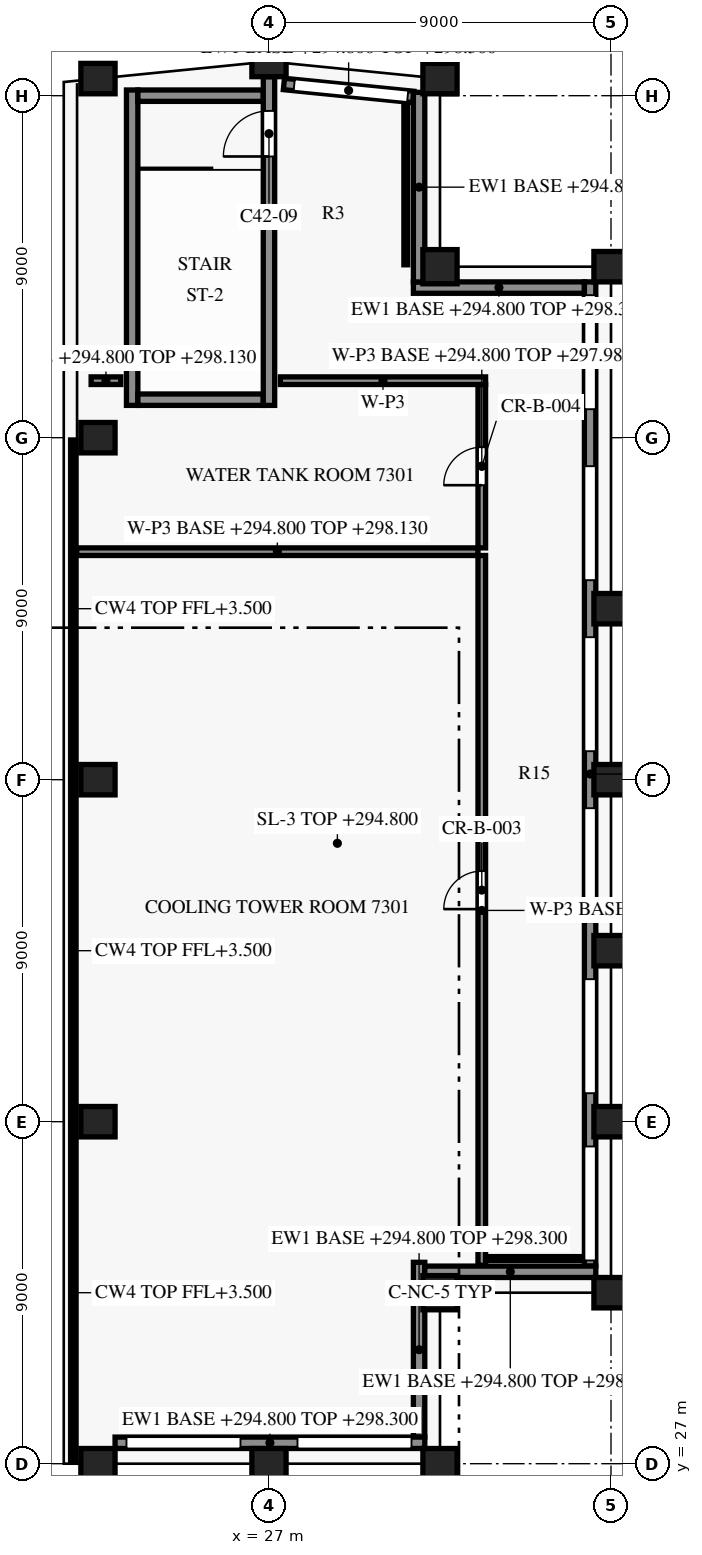
"""IFC4 building model, lengths in metres.
Left out: names, types, materials, properties, quantities, classifications, styles, units other than length and angle.
Written with IfcOpenShell. Run it as: python <this file> out.ifc"""

import sys

from ifc_helpers import new_model, si_unit, direction, frame, frame_2d, origin, origin_2d, place, context, subcontext, project, spatial, rectangle, extrude, element, fill, save


model = new_model("IFC4")
c1 = context("Model", 3, precision=1e-05, world=origin(), true_north=direction((0.0, 1.0)))
c2 = subcontext(c1, "Body", "Model", "MODEL_VIEW")
j1 = project(units=[si_unit("LENGTHUNIT", "METRE"), si_unit("PLANEANGLEUNIT", "RADIAN")], contexts=[c1])
p1 = place(None, origin())
s1 = spatial("IfcSite", under=j1, at=p1, CompositionType="ELEMENT")
p2 = place(p1, origin())
s2 = spatial("IfcBuilding", under=s1, at=p2, CompositionType="ELEMENT")
p3 = place(p2, frame((0.0, 0.0, 294.8)))
s3 = spatial("IfcBuildingStorey", under=s2, at=p3, CompositionType="ELEMENT", Elevation=294.8)
for number, where, z_axis, x_axis in (
    (1, (36.0, 31.5, 0.0), (0.0, 0.0, 1.0), (0.0, 1.0, 0.0)),
    (2, (36.0, 36.0, 0.0), (0.0, 0.0, 1.0), (0.0, 1.0, 0.0)),
    (3, (36.0, 40.5, 0.0), (0.0, 0.0, 1.0), (0.0, 1.0, 0.0)),
    (4, (36.0, 45.0, 0.0), (0.0, 0.0, 1.0), (0.0, 1.0, 0.0)),
    (5, (36.0, 49.5, 0.0), (0.0, 0.0, 1.0), (0.0, 1.0, 0.0)),
    (6, (36.0, 58.5, 0.0), (0.0, 0.0, 1.0), (0.0, 1.0, 0.0)),
    (7, (31.5, 63.45, 0.0), (0.0, 0.0, 1.0), (-0.995, 0.1, 0.0)),
    (8, (27.0, 63.9, 0.0), (0.0, 0.0, 1.0), (-1.0, 0.0, 0.0)),
    (9, (22.5, 63.45, 0.0), (0.0, 0.0, 1.0), (-0.995, -0.1, 0.0)),
    (10, (22.5, 54.0, 0.0), (0.0, 0.0, 1.0), (1.0, 0.0, 0.0)),
    (11, (22.5, 45.0, 0.0), (0.0, 0.0, 1.0), (1.0, 0.0, 0.0)),
    (12, (22.5, 36.0, 0.0), (0.0, 0.0, 1.0), (1.0, 0.0, 0.0)),
):
    element("IfcColumn", number, at=place(p3, frame(where, z_axis=z_axis, x_axis=x_axis)), inside=s3, PredefinedType="COLUMN", context=c2, shape_type="SweptSolid", body=[
        extrude(rectangle(XDim=0.9, YDim=0.8, at=origin_2d()), origin(), (0.0, 0.0, 1.0), 4.0),
    ])
for number, where, z_axis, x_axis in (
    (13, (31.5, 31.5, 0.0), (0.0, 0.0, 1.0), (1.0, 0.0, 0.0)),
    (14, (31.5, 58.5, 0.0), (0.0, 0.0, 1.0), (1.0, 0.0, 0.0)),
):
    element("IfcColumn", number, at=place(p3, frame(where, z_axis=z_axis, x_axis=x_axis)), inside=s3, PredefinedType="COLUMN", context=c2, shape_type="SweptSolid", body=[
        extrude(rectangle(XDim=0.9, YDim=0.9, at=origin_2d()), origin(), (0.0, 0.0, 1.0), 4.0),
    ])
for number, where, z_axis, x_axis in (
    (15, (22.5, 27.0, 0.0), (0.0, 0.0, 1.0), (1.0, 0.0, 0.0)),
    (16, (27.0, 27.0, 0.0), (0.0, 0.0, 1.0), (1.0, 0.0, 0.0)),
    (17, (31.5, 27.0, 0.0), (0.0, 0.0, 1.0), (1.0, 0.0, 0.0)),
):
    element("IfcColumn", number, at=place(p3, frame(where, z_axis=z_axis, x_axis=x_axis)), inside=s3, PredefinedType="COLUMN", context=c2, shape_type="SweptSolid", body=[
        extrude(rectangle(XDim=0.9, YDim=0.8, at=origin_2d()), origin(), (0.0, 0.0, 1.0), 4.0),
    ])
p4 = place(p3, frame((31.1, 27.55, 0.0), z_axis=(0.0, 0.0, 1.0), x_axis=(-1.0, 0.0, 0.0)))
e18 = element("IfcWall", 18, at=p4, inside=s3, PredefinedType="SOLIDWALL", context=c2, shape_type="SweptSolid", body=[
    extrude(rectangle(XDim=8.15, YDim=0.3, at=frame_2d((4.075, 0.0))), origin(), (0.0, 0.0, 1.0), 3.5),
])
p5 = place(p4, frame((0.35, 0.0, 0.9)))
e19 = element("IfcOpeningElement", 19, at=p5, cuts=e18, PredefinedType="OPENING", context=c2, shape_type="SweptSolid", body=[
    extrude(rectangle(XDim=3.0, YDim=1.8, at=frame_2d((1.5, 0.9))), frame((0.0, 0.16, 0.0), z_axis=(0.0, -1.0, 0.0), x_axis=(1.0, 0.0, 0.0)), (0.0, 0.0, 1.0), 0.32),
])
p6 = place(p4, frame((4.85, 0.0, 0.9)))
e20 = element("IfcOpeningElement", 20, at=p6, cuts=e18, PredefinedType="OPENING", context=c2, shape_type="SweptSolid", body=[
    extrude(rectangle(XDim=3.0, YDim=1.8, at=frame_2d((1.5, 0.9))), frame((0.0, 0.16, 0.0), z_axis=(0.0, -1.0, 0.0), x_axis=(1.0, 0.0, 0.0)), (0.0, 0.0, 1.0), 0.32),
])
p7 = place(p3, frame((30.95, 32.3, 0.0), z_axis=(0.0, 0.0, 1.0), x_axis=(0.0, -1.0, 0.0)))
e21 = element("IfcWall", 21, at=p7, inside=s3, PredefinedType="SOLIDWALL", context=c2, shape_type="SweptSolid", body=[
    extrude(rectangle(XDim=4.6, YDim=0.3, at=frame_2d((2.3, 0.0))), origin(), (0.0, 0.0, 1.0), 3.5),
])
p8 = place(p3, frame((35.6, 32.05, 0.0), z_axis=(0.0, 0.0, 1.0), x_axis=(-1.0, 0.0, 0.0)))
e22 = element("IfcWall", 22, at=p8, inside=s3, PredefinedType="SOLIDWALL", context=c2, shape_type="SweptSolid", body=[
    extrude(rectangle(XDim=4.5, YDim=0.3, at=frame_2d((2.25, 0.0))), origin(), (0.0, 0.0, 1.0), 3.5),
])
p9 = place(p3, frame((35.45, 58.1, 0.0), z_axis=(0.0, 0.0, 1.0), x_axis=(0.0, -1.0, 0.0)))
e23 = element("IfcWall", 23, at=p9, inside=s3, PredefinedType="SOLIDWALL", context=c2, shape_type="SweptSolid", body=[
    extrude(rectangle(XDim=25.902, YDim=0.3, at=frame_2d((12.951, 0.0))), origin(), (0.0, 0.0, 1.0), 3.5),
])
p10 = place(p9, frame((0.35, 0.0, 0.9)))
e24 = element("IfcOpeningElement", 24, at=p10, cuts=e23, PredefinedType="OPENING", context=c2, shape_type="SweptSolid", body=[
    extrude(rectangle(XDim=3.0, YDim=1.8, at=frame_2d((1.5, 0.9))), frame((0.0, 0.16, 0.0), z_axis=(0.0, -1.0, 0.0), x_axis=(1.0, 0.0, 0.0)), (0.0, 0.0, 1.0), 0.32),
])
p11 = place(p9, frame((4.85, 0.0, 0.9)))
e25 = element("IfcOpeningElement", 25, at=p11, cuts=e23, PredefinedType="OPENING", context=c2, shape_type="SweptSolid", body=[
    extrude(rectangle(XDim=3.0, YDim=1.8, at=frame_2d((1.5, 0.9))), frame((0.0, 0.16, 0.0), z_axis=(0.0, -1.0, 0.0), x_axis=(1.0, 0.0, 0.0)), (0.0, 0.0, 1.0), 0.32),
])
p12 = place(p9, frame((9.35, 0.0, 0.9)))
e26 = element("IfcOpeningElement", 26, at=p12, cuts=e23, PredefinedType="OPENING", context=c2, shape_type="SweptSolid", body=[
    extrude(rectangle(XDim=3.0, YDim=1.8, at=frame_2d((1.5, 0.9))), frame((0.0, 0.16, 0.0), z_axis=(0.0, -1.0, 0.0), x_axis=(1.0, 0.0, 0.0)), (0.0, 0.0, 1.0), 0.32),
])
p13 = place(p9, frame((13.85, 0.0, 0.9)))
e27 = element("IfcOpeningElement", 27, at=p13, cuts=e23, PredefinedType="OPENING", context=c2, shape_type="SweptSolid", body=[
    extrude(rectangle(XDim=3.0, YDim=1.8, at=frame_2d((1.5, 0.9))), frame((0.0, 0.16, 0.0), z_axis=(0.0, -1.0, 0.0), x_axis=(1.0, 0.0, 0.0)), (0.0, 0.0, 1.0), 0.32),
])
p14 = place(p9, frame((18.35, 0.0, 0.9)))
e28 = element("IfcOpeningElement", 28, at=p14, cuts=e23, PredefinedType="OPENING", context=c2, shape_type="SweptSolid", body=[
    extrude(rectangle(XDim=3.0, YDim=1.8, at=frame_2d((1.5, 0.9))), frame((0.0, 0.16, 0.0), z_axis=(0.0, -1.0, 0.0), x_axis=(1.0, 0.0, 0.0)), (0.0, 0.0, 1.0), 0.32),
])
p15 = place(p9, frame((22.752, 0.0, 0.9)))
e29 = element("IfcOpeningElement", 29, at=p15, cuts=e23, PredefinedType="OPENING", context=c2, shape_type="SweptSolid", body=[
    extrude(rectangle(XDim=3.0, YDim=1.8, at=frame_2d((1.5, 0.9))), frame((0.0, 0.16, 0.0), z_axis=(0.0, -1.0, 0.0), x_axis=(1.0, 0.0, 0.0)), (0.0, 0.0, 1.0), 0.32),
])
p16 = place(p3, frame((30.8, 57.95, 0.0), z_axis=(0.0, 0.0, 1.0), x_axis=(1.0, 0.0, 0.0)))
e30 = element("IfcWall", 30, at=p16, inside=s3, PredefinedType="SOLIDWALL", context=c2, shape_type="SweptSolid", body=[
    extrude(rectangle(XDim=4.502, YDim=0.3, at=frame_2d((2.251, 0.0))), origin(), (0.0, 0.0, 1.0), 3.5),
])
p17 = place(p3, frame((30.95, 63.088, 0.0), z_axis=(0.0, 0.0, 1.0), x_axis=(0.0, -1.0, 0.0)))
e31 = element("IfcWall", 31, at=p17, inside=s3, PredefinedType="SOLIDWALL", context=c2, shape_type="SweptSolid", body=[
    extrude(rectangle(XDim=4.99, YDim=0.3, at=frame_2d((2.495, 0.0))), origin(), (0.0, 0.0, 1.0), 3.5),
])
p18 = place(p3, frame((27.393, 63.308, 0.0), z_axis=(0.0, 0.0, 1.0), x_axis=(0.995030125493, -0.099574340874, 0.0)))
e32 = element("IfcWall", 32, at=p18, inside=s3, PredefinedType="SOLIDWALL", context=c2, shape_type="SweptSolid", body=[
    extrude(rectangle(XDim=3.423, YDim=0.3, at=frame_2d((1.711, 0.0))), origin(), (0.0, 0.0, 1.0), 3.5),
])
p19 = place(p18, frame((0.273, 0.0, 0.9)))
e33 = element("IfcOpeningElement", 33, at=p19, cuts=e32, PredefinedType="OPENING", context=c2, shape_type="SweptSolid", body=[
    extrude(rectangle(XDim=3.0, YDim=1.8, at=frame_2d((1.5, 0.9))), frame((0.0, 0.16, 0.0), z_axis=(0.0, -1.0, 0.0), x_axis=(1.0, 0.0, 0.0)), (0.0, 0.0, 1.0), 0.32),
])
for number, where, z_axis, x_axis in (
    (34, (23.55, 55.0, 0.0), (0.0, 0.0, 1.0), (1.0, 0.0, 0.0)),
    (35, (23.55, 63.0, 0.0), (0.0, 0.0, 1.0), (1.0, 0.0, 0.0)),
):
    element("IfcWall", number, at=place(p3, frame(where, z_axis=z_axis, x_axis=x_axis)), inside=s3, PredefinedType="SHEAR", context=c2, shape_type="SweptSolid", body=[
        extrude(rectangle(XDim=3.3, YDim=0.3, at=frame_2d((1.65, 0.0))), origin(), (0.0, 0.0, 1.0), 3.7),
    ])
p20 = place(p3, frame((23.4, 54.85, 0.0), z_axis=(0.0, 0.0, 1.0), x_axis=(0.0, 1.0, 0.0)))
e36 = element("IfcWall", 36, at=p20, inside=s3, PredefinedType="SHEAR", context=c2, shape_type="SweptSolid", body=[
    extrude(rectangle(XDim=8.3, YDim=0.3, at=frame_2d((4.15, 0.0))), origin(), (0.0, 0.0, 1.0), 3.7),
])
p21 = place(p3, frame((27.0, 54.85, 0.0), z_axis=(0.0, 0.0, 1.0), x_axis=(0.0, 1.0, 0.0)))
e37 = element("IfcWall", 37, at=p21, inside=s3, PredefinedType="SHEAR", context=c2, shape_type="SweptSolid", body=[
    extrude(rectangle(XDim=8.65, YDim=0.3, at=frame_2d((4.325, 0.0))), origin(), (0.0, 0.0, 1.0), 3.7),
])
p22 = place(p21, frame((6.55, 0.0, 0.0)))
e38 = element("IfcOpeningElement", 38, at=p22, cuts=e37, PredefinedType="OPENING", context=c2, shape_type="SweptSolid", body=[
    extrude(rectangle(XDim=1.2, YDim=2.2, at=frame_2d((0.6, 1.1))), frame((0.0, 0.16, 0.0), z_axis=(0.0, -1.0, 0.0), x_axis=(1.0, 0.0, 0.0)), (0.0, 0.0, 1.0), 0.32),
])
p23 = place(p3, frame((35.28, 32.4, 0.0), z_axis=(0.0, 0.0, 1.0), x_axis=(-1.0, 0.0, 0.0)))
e39 = element("IfcWall", 39, at=p23, inside=s3, PredefinedType="PARTITIONING", context=c2, shape_type="SweptSolid", body=[
    extrude(rectangle(XDim=2.58, YDim=0.1, at=frame_2d((1.29, 0.0))), origin(), (0.0, 0.0, 1.0), 3.68),
])
p24 = place(p3, frame((32.6, 32.22, 0.0), z_axis=(0.0, 0.0, 1.0), x_axis=(0.0, 1.0, 0.0)))
e40 = element("IfcWall", 40, at=p24, inside=s3, PredefinedType="PARTITIONING", context=c2, shape_type="SweptSolid", body=[
    extrude(rectangle(XDim=18.68, YDim=0.2, at=frame_2d((9.34, 0.0))), origin(), (0.0, 0.0, 1.0), 3.18),
])
p25 = place(p24, frame((9.375, 0.0, 0.0)))
e41 = element("IfcOpeningElement", 41, at=p25, cuts=e40, PredefinedType="OPENING", context=c2, shape_type="SweptSolid", body=[
    extrude(rectangle(XDim=1.0, YDim=2.1, at=frame_2d((0.5, 1.05))), frame((0.0, 0.11, 0.0), z_axis=(0.0, -1.0, 0.0), x_axis=(1.0, 0.0, 0.0)), (0.0, 0.0, 1.0), 0.22),
])
p26 = place(p3, frame((21.94, 51.0, 0.0), z_axis=(0.0, 0.0, 1.0), x_axis=(1.0, 0.0, 0.0)))
e42 = element("IfcWall", 42, at=p26, inside=s3, PredefinedType="PARTITIONING", context=c2, shape_type="SweptSolid", body=[
    extrude(rectangle(XDim=10.56, YDim=0.2, at=frame_2d((5.28, 0.0))), origin(), (0.0, 0.0, 1.0), 3.33),
])
p27 = place(p3, frame((32.6, 51.1, 0.0), z_axis=(0.0, 0.0, 1.0), x_axis=(0.0, 1.0, 0.0)))
e43 = element("IfcWall", 43, at=p27, inside=s3, PredefinedType="PARTITIONING", context=c2, shape_type="SweptSolid", body=[
    extrude(rectangle(XDim=4.3, YDim=0.2, at=frame_2d((2.15, 0.0))), origin(), (0.0, 0.0, 1.0), 3.18),
])
p28 = place(p27, frame((1.65, 0.0, 0.0)))
e44 = element("IfcOpeningElement", 44, at=p28, cuts=e43, PredefinedType="OPENING", context=c2, shape_type="SweptSolid", body=[
    extrude(rectangle(XDim=1.0, YDim=2.1, at=frame_2d((0.5, 1.05))), frame((0.0, 0.11, 0.0), z_axis=(0.0, -1.0, 0.0), x_axis=(1.0, 0.0, 0.0)), (0.0, 0.0, 1.0), 0.22),
])
p29 = place(p3, frame((22.32, 55.5, 0.0), z_axis=(0.0, 0.0, 1.0), x_axis=(1.0, 0.0, 0.0)))
e45 = element("IfcWall", 45, at=p29, inside=s3, PredefinedType="PARTITIONING", context=c2, shape_type="SweptSolid", body=[
    extrude(rectangle(XDim=0.78, YDim=0.2, at=frame_2d((0.39, 0.0))), origin(), (0.0, 0.0, 1.0), 3.33),
])
p30 = place(p3, frame((32.7, 55.5, 0.0), z_axis=(0.0, 0.0, 1.0), x_axis=(-1.0, 0.0, 0.0)))
e46 = element("IfcWall", 46, at=p30, inside=s3, PredefinedType="PARTITIONING", context=c2, shape_type="SweptSolid", body=[
    extrude(rectangle(XDim=5.4, YDim=0.2, at=frame_2d((2.7, 0.0))), origin(), (0.0, 0.0, 1.0), 3.68),
])
p31 = place(p3, frame((30.6, 62.816, 0.0), z_axis=(0.0, 0.0, 1.0), x_axis=(0.0, -1.0, 0.0)))
e47 = element("IfcWall", 47, at=p31, inside=s3, PredefinedType="PARTITIONING", context=c2, shape_type="SweptSolid", body=[
    extrude(rectangle(XDim=4.266, YDim=0.1, at=frame_2d((2.133, 0.0))), origin(), (0.0, 0.0, 1.0), 3.68),
])
p32 = place(p5, origin())
e48 = element("IfcWindow", 48, at=p32, inside=s3, PartitioningType="SINGLE_PANEL", PredefinedType="WINDOW", context=c2, shape_type="SweptSolid", body=[
    extrude(rectangle(XDim=3.0, YDim=1.8, at=frame_2d((1.5, 0.9))), frame((0.0, 0.03, 0.0), z_axis=(0.0, -1.0, 0.0), x_axis=(1.0, 0.0, 0.0)), (0.0, 0.0, 1.0), 0.06),
])
fill(e19, e48)
p33 = place(p6, origin())
e49 = element("IfcWindow", 49, at=p33, inside=s3, PartitioningType="SINGLE_PANEL", PredefinedType="WINDOW", context=c2, shape_type="SweptSolid", body=[
    extrude(rectangle(XDim=3.0, YDim=1.8, at=frame_2d((1.5, 0.9))), frame((0.0, 0.03, 0.0), z_axis=(0.0, -1.0, 0.0), x_axis=(1.0, 0.0, 0.0)), (0.0, 0.0, 1.0), 0.06),
])
fill(e20, e49)
p34 = place(p10, origin())
e50 = element("IfcWindow", 50, at=p34, inside=s3, PartitioningType="SINGLE_PANEL", PredefinedType="WINDOW", context=c2, shape_type="SweptSolid", body=[
    extrude(rectangle(XDim=3.0, YDim=1.8, at=frame_2d((1.5, 0.9))), frame((0.0, 0.03, 0.0), z_axis=(0.0, -1.0, 0.0), x_axis=(1.0, 0.0, 0.0)), (0.0, 0.0, 1.0), 0.06),
])
fill(e24, e50)
p35 = place(p11, origin())
e51 = element("IfcWindow", 51, at=p35, inside=s3, PartitioningType="SINGLE_PANEL", PredefinedType="WINDOW", context=c2, shape_type="SweptSolid", body=[
    extrude(rectangle(XDim=3.0, YDim=1.8, at=frame_2d((1.5, 0.9))), frame((0.0, 0.03, 0.0), z_axis=(0.0, -1.0, 0.0), x_axis=(1.0, 0.0, 0.0)), (0.0, 0.0, 1.0), 0.06),
])
fill(e25, e51)
p36 = place(p12, origin())
e52 = element("IfcWindow", 52, at=p36, inside=s3, PartitioningType="SINGLE_PANEL", PredefinedType="WINDOW", context=c2, shape_type="SweptSolid", body=[
    extrude(rectangle(XDim=3.0, YDim=1.8, at=frame_2d((1.5, 0.9))), frame((0.0, 0.03, 0.0), z_axis=(0.0, -1.0, 0.0), x_axis=(1.0, 0.0, 0.0)), (0.0, 0.0, 1.0), 0.06),
])
fill(e26, e52)
p37 = place(p13, origin())
e53 = element("IfcWindow", 53, at=p37, inside=s3, PartitioningType="SINGLE_PANEL", PredefinedType="WINDOW", context=c2, shape_type="SweptSolid", body=[
    extrude(rectangle(XDim=3.0, YDim=1.8, at=frame_2d((1.5, 0.9))), frame((0.0, 0.03, 0.0), z_axis=(0.0, -1.0, 0.0), x_axis=(1.0, 0.0, 0.0)), (0.0, 0.0, 1.0), 0.06),
])
fill(e27, e53)
p38 = place(p14, origin())
e54 = element("IfcWindow", 54, at=p38, inside=s3, PartitioningType="SINGLE_PANEL", PredefinedType="WINDOW", context=c2, shape_type="SweptSolid", body=[
    extrude(rectangle(XDim=3.0, YDim=1.8, at=frame_2d((1.5, 0.9))), frame((0.0, 0.03, 0.0), z_axis=(0.0, -1.0, 0.0), x_axis=(1.0, 0.0, 0.0)), (0.0, 0.0, 1.0), 0.06),
])
fill(e28, e54)
p39 = place(p15, origin())
e55 = element("IfcWindow", 55, at=p39, inside=s3, PartitioningType="SINGLE_PANEL", PredefinedType="WINDOW", context=c2, shape_type="SweptSolid", body=[
    extrude(rectangle(XDim=3.0, YDim=1.8, at=frame_2d((1.5, 0.9))), frame((0.0, 0.03, 0.0), z_axis=(0.0, -1.0, 0.0), x_axis=(1.0, 0.0, 0.0)), (0.0, 0.0, 1.0), 0.06),
])
fill(e29, e55)
p40 = place(p19, origin())
e56 = element("IfcWindow", 56, at=p40, inside=s3, PartitioningType="SINGLE_PANEL", PredefinedType="WINDOW", context=c2, shape_type="SweptSolid", body=[
    extrude(rectangle(XDim=3.0, YDim=1.8, at=frame_2d((1.5, 0.9))), frame((0.0, 0.03, 0.0), z_axis=(0.0, -1.0, 0.0), x_axis=(1.0, 0.0, 0.0)), (0.0, 0.0, 1.0), 0.06),
])
fill(e33, e56)
p41 = place(p22, origin())
e57 = element("IfcDoor", 57, at=p41, inside=s3, OperationType="SINGLE_SWING_LEFT", PredefinedType="DOOR", context=c2, shape_type="SweptSolid", body=[
    extrude(rectangle(XDim=1.2, YDim=2.2, at=frame_2d((0.6, 1.1))), frame((0.0, 0.025, 0.0), z_axis=(0.0, -1.0, 0.0), x_axis=(1.0, 0.0, 0.0)), (0.0, 0.0, 1.0), 0.05),
])
fill(e38, e57)
p42 = place(p25, origin())
e58 = element("IfcDoor", 58, at=p42, inside=s3, OperationType="SINGLE_SWING_LEFT", PredefinedType="DOOR", context=c2, shape_type="SweptSolid", body=[
    extrude(rectangle(XDim=1.0, YDim=2.1, at=frame_2d((0.5, 1.05))), frame((0.0, 0.025, 0.0), z_axis=(0.0, -1.0, 0.0), x_axis=(1.0, 0.0, 0.0)), (0.0, 0.0, 1.0), 0.05),
])
fill(e41, e58)
p43 = place(p28, origin())
e59 = element("IfcDoor", 59, at=p43, inside=s3, OperationType="SINGLE_SWING_RIGHT", PredefinedType="DOOR", context=c2, shape_type="SweptSolid", body=[
    extrude(rectangle(XDim=1.0, YDim=2.1, at=frame_2d((0.5, 1.05))), frame((0.0, 0.025, 0.0), z_axis=(0.0, -1.0, 0.0), x_axis=(1.0, 0.0, 0.0)), (0.0, 0.0, 1.0), 0.05),
])
fill(e44, e59)
save(model, sys.argv[1])
